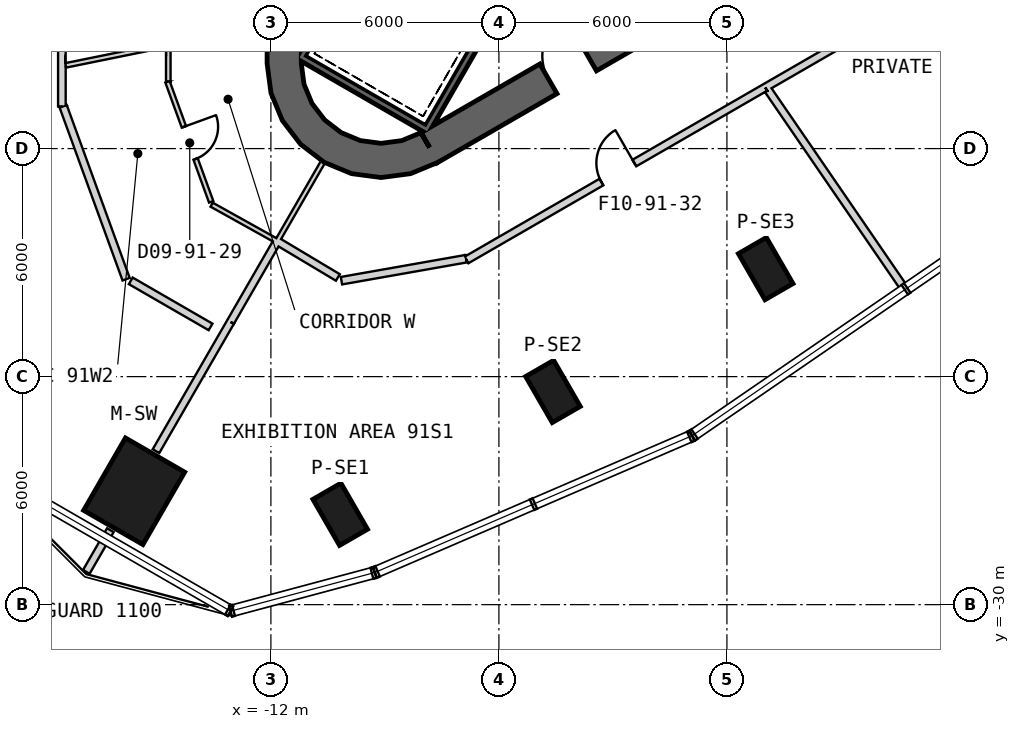
"""IFC4 building model, lengths in metres.
Left out: names, types, materials, properties, quantities, classifications, styles, units other than length and angle.
Written with IfcOpenShell. Run it as: python <this file> out.ifc"""

import sys

from ifc_helpers import new_model, si_unit, direction, frame, frame_2d, origin, origin_2d, place, context, subcontext, project, spatial, polyline, rectangle, outline, extrude, element, fill, save


model = new_model("IFC4")
c1 = context("Model", 3, precision=1e-05, world=origin(), true_north=direction((0.0, 1.0)))
c2 = subcontext(c1, "Body", "Model", "MODEL_VIEW")
j1 = project(units=[si_unit("LENGTHUNIT", "METRE"), si_unit("PLANEANGLEUNIT", "RADIAN")], contexts=[c1])
p1 = place(None, origin())
s1 = spatial("IfcSite", under=j1, at=p1, CompositionType="ELEMENT")
p2 = place(p1, origin())
s2 = spatial("IfcBuilding", under=s1, at=p2, CompositionType="ELEMENT")
p3 = place(p2, frame((0.0, 0.0, 398.3)))
s3 = spatial("IfcBuildingStorey", under=s2, at=p3, CompositionType="ELEMENT", Elevation=398.3)
p4 = place(p3, frame((-15.598, -27.016, 0.0), z_axis=(0.0, 0.0, 1.0), x_axis=(-0.5, -0.866025403784, 0.0)))
e1 = element("IfcColumn", 1, at=p4, inside=s3, PredefinedType="COLUMN", context=c2, shape_type="SweptSolid", body=[
    extrude(rectangle(XDim=2.2, YDim=1.8, at=origin_2d()), origin(), (0.0, 0.0, 1.0), 6.5),
])
for number, where, z_axis, x_axis in (
    (2, (-10.176, -27.623, 0.0), (0.0, 0.0, 1.0), (0.5, -0.866, 0.0)),
    (3, (-4.578, -24.391, 0.0), (0.0, 0.0, 1.0), (0.5, -0.866, 0.0)),
):
    element("IfcColumn", number, at=place(p3, frame(where, z_axis=z_axis, x_axis=x_axis)), inside=s3, PredefinedType="COLUMN", context=c2, shape_type="SweptSolid", body=[
        extrude(rectangle(XDim=1.4, YDim=0.85, at=origin_2d()), origin(), (0.0, 0.0, 1.0), 6.5),
    ])
p5 = place(p3, frame((1.02, -21.159, -0.3), z_axis=(0.0, 0.0, 1.0), x_axis=(0.5, -0.866025403784, 0.0)))
e4 = element("IfcColumn", 4, at=p5, inside=s3, PredefinedType="COLUMN", context=c2, shape_type="SweptSolid", body=[
    extrude(rectangle(XDim=1.4, YDim=0.85, at=origin_2d()), origin(), (0.0, 0.0, 1.0), 6.8),
])
p6 = place(p3, frame((-11.65, 15.762, 0.0), z_axis=(0.0, 0.0, 1.0), x_axis=(0.0, -1.0, 0.0)))
e5 = element("IfcWall", 5, at=p6, inside=s3, PredefinedType="SHEAR", context=c2, shape_type="SweptSolid", body=[
    extrude(rectangle(XDim=31.523, YDim=0.9, at=frame_2d((15.762, 0.0))), origin(), (0.0, 0.0, 1.0), 6.5),
])
p7 = place(p6, frame((3.612, 0.0, 0.0)))
e6 = element("IfcOpeningElement", 6, at=p7, cuts=e5, PredefinedType="OPENING", context=c2, shape_type="SweptSolid", body=[
    extrude(rectangle(XDim=1.2, YDim=2.4, at=frame_2d((0.6, 1.2))), frame((0.0, 0.46, 0.0), z_axis=(0.0, -1.0, 0.0), x_axis=(1.0, 0.0, 0.0)), (0.0, 0.0, 1.0), 0.92),
])
p8 = place(p6, frame((26.712, 0.0, 0.0)))
e7 = element("IfcOpeningElement", 7, at=p8, cuts=e5, PredefinedType="OPENING", context=c2, shape_type="SweptSolid", body=[
    extrude(rectangle(XDim=1.2, YDim=2.4, at=frame_2d((0.6, 1.2))), frame((0.0, 0.46, 0.0), z_axis=(0.0, -1.0, 0.0), x_axis=(1.0, 0.0, 0.0)), (0.0, 0.0, 1.0), 0.92),
])
p9 = place(p3, frame((-7.825, -17.97, 0.0), z_axis=(0.0, 0.0, 1.0), x_axis=(0.866028369851, 0.499994862586, 0.0)))
e8 = element("IfcWall", 8, at=p9, inside=s3, PredefinedType="SHEAR", context=c2, shape_type="SweptSolid", body=[
    extrude(rectangle(XDim=31.523, YDim=0.9, at=frame_2d((15.762, 0.0))), origin(), (0.0, 0.0, 1.0), 6.5),
])
p10 = place(p9, frame((7.062, 0.0, 0.0)))
e9 = element("IfcOpeningElement", 9, at=p10, cuts=e8, PredefinedType="OPENING", context=c2, shape_type="SweptSolid", body=[
    extrude(rectangle(XDim=1.2, YDim=2.4, at=frame_2d((0.6, 1.2))), frame((0.0, 0.46, 0.0), z_axis=(0.0, -1.0, 0.0), x_axis=(1.0, 0.0, 0.0)), (0.0, 0.0, 1.0), 0.92),
])
p11 = place(p9, frame((9.762, 0.0, 0.0)))
e10 = element("IfcOpeningElement", 10, at=p11, cuts=e8, PredefinedType="OPENING", context=c2, shape_type="SweptSolid", body=[
    extrude(rectangle(XDim=1.2, YDim=2.4, at=frame_2d((0.6, 1.2))), frame((0.0, 0.46, 0.0), z_axis=(0.0, -1.0, 0.0), x_axis=(1.0, 0.0, 0.0)), (0.0, 0.0, 1.0), 0.92),
])
p12 = place(p9, frame((17.862, 0.0, 0.0)))
e11 = element("IfcOpeningElement", 11, at=p12, cuts=e8, PredefinedType="OPENING", context=c2, shape_type="SweptSolid", body=[
    extrude(rectangle(XDim=1.2, YDim=2.4, at=frame_2d((0.6, 1.2))), frame((0.0, 0.46, 0.0), z_axis=(0.0, -1.0, 0.0), x_axis=(1.0, 0.0, 0.0)), (0.0, 0.0, 1.0), 0.92),
])
p13 = place(p9, frame((20.562, 0.0, 0.0)))
e12 = element("IfcOpeningElement", 12, at=p13, cuts=e8, PredefinedType="OPENING", context=c2, shape_type="SweptSolid", body=[
    extrude(rectangle(XDim=1.2, YDim=2.4, at=frame_2d((0.6, 1.2))), frame((0.0, 0.46, 0.0), z_axis=(0.0, -1.0, 0.0), x_axis=(1.0, 0.0, 0.0)), (0.0, 0.0, 1.0), 0.92),
])
p14 = place(p9, frame((26.712, 0.0, 0.0)))
e13 = element("IfcOpeningElement", 13, at=p14, cuts=e8, PredefinedType="OPENING", context=c2, shape_type="SweptSolid", body=[
    extrude(rectangle(XDim=1.2, YDim=2.4, at=frame_2d((0.6, 1.2))), frame((0.0, 0.46, 0.0), z_axis=(0.0, -1.0, 0.0), x_axis=(1.0, 0.0, 0.0)), (0.0, 0.0, 1.0), 0.92),
])
p15 = place(p9, frame((3.612, 0.0, 0.0)))
e14 = element("IfcOpeningElement", 14, at=p15, cuts=e8, PredefinedType="OPENING", context=c2, shape_type="SweptSolid", body=[
    extrude(rectangle(XDim=1.2, YDim=2.4, at=frame_2d((0.6, 1.2))), frame((0.0, 0.46, 0.0), z_axis=(0.0, -1.0, 0.0), x_axis=(1.0, 0.0, 0.0)), (0.0, 0.0, 1.0), 0.92),
])
p16 = place(p3, origin())
e15 = element("IfcWall", 15, at=p16, inside=s3, PredefinedType="SHEAR", context=c2, shape_type="SweptSolid", body=[
    extrude(outline(polyline([(-12.1, -15.762), (-11.998, -16.538), (-11.698, -17.262), (-11.221, -17.883), (-10.6, -18.36), (-9.876, -18.659), (-9.1, -18.762), (-8.323, -18.659), (-7.6, -18.36), (-8.05, -17.58), (-8.556, -17.79), (-9.1, -17.862), (-9.644, -17.79), (-10.15, -17.58), (-10.585, -17.247), (-10.919, -16.812), (-11.128, -16.305), (-11.2, -15.762), (-12.1, -15.762)])), origin(), (0.0, 0.0, 1.0), 6.5),
])
p17 = place(p3, frame((-3.905, -10.563, -0.3), z_axis=(0.0, 0.0, 1.0), x_axis=(-0.500012932018, -0.866017937352, 0.0)))
e16 = element("IfcWall", 16, at=p17, inside=s3, PredefinedType="SHEAR", context=c2, shape_type="SweptSolid", body=[
    extrude(rectangle(XDim=8.1, YDim=0.2, at=frame_2d((4.05, 0.0))), origin(), (0.0, 0.0, 1.0), 6.5),
])
p18 = place(p3, frame((-11.282, -15.541, -0.3), z_axis=(0.0, 0.0, 1.0), x_axis=(0.866000483506, -0.500043160704, 0.0)))
e17 = element("IfcWall", 17, at=p18, inside=s3, PredefinedType="SHEAR", context=c2, shape_type="SweptSolid", body=[
    extrude(rectangle(XDim=3.8, YDim=0.2, at=frame_2d((1.9, 0.0))), origin(), (0.0, 0.0, 1.0), 6.5),
])
p19 = place(p3, frame((-7.196, -8.663, -0.3), z_axis=(0.0, 0.0, 1.0), x_axis=(-0.499997992926, -0.866026562566, 0.0)))
e18 = element("IfcWall", 18, at=p19, inside=s3, PredefinedType="SHEAR", context=c2, shape_type="SweptSolid", body=[
    extrude(rectangle(XDim=7.9, YDim=0.2, at=frame_2d((3.95, 0.0))), origin(), (0.0, 0.0, 1.0), 6.5),
])
p20 = place(p3, frame((-14.7, -15.255, 0.0), z_axis=(0.0, 0.0, 1.0), x_axis=(0.0, -1.0, 0.0)))
e19 = element("IfcWall", 19, at=p20, inside=s3, PredefinedType="PARTITIONING", context=c2, shape_type="SweptSolid", body=[
    extrude(rectangle(XDim=0.985, YDim=0.12, at=frame_2d((0.492, 0.0))), origin(), (0.0, 0.0, 1.0), 6.2),
])
p21 = place(p3, frame((-13.559, -19.476, 0.0), z_axis=(0.0, 0.0, 1.0), x_axis=(0.873536168316, -0.486759245052, 0.0)))
e20 = element("IfcWall", 20, at=p21, inside=s3, PredefinedType="PARTITIONING", context=c2, shape_type="SweptSolid", body=[
    extrude(rectangle(XDim=2.005, YDim=0.12, at=frame_2d((1.002, 0.0))), origin(), (0.0, 0.0, 1.0), 5.57),
])
p22 = place(p3, frame((-14.72, -16.243, 0.0), z_axis=(0.0, 0.0, 1.0), x_axis=(0.342046381322, -0.939683070521, 0.0)))
e21 = element("IfcWall", 21, at=p22, inside=s3, PredefinedType="PARTITIONING", context=c2, shape_type="SweptSolid", body=[
    extrude(rectangle(XDim=3.36, YDim=0.12, at=frame_2d((1.68, 0.0))), origin(), (0.0, 0.0, 1.0), 5.57),
])
p23 = place(p22, frame((1.26, 0.0, 0.0)))
e22 = element("IfcOpeningElement", 22, at=p23, cuts=e21, PredefinedType="OPENING", context=c2, shape_type="SweptSolid", body=[
    extrude(rectangle(XDim=0.9, YDim=2.1, at=frame_2d((0.45, 1.05))), frame((0.0, 0.07, 0.0), z_axis=(0.0, -1.0, 0.0), x_axis=(1.0, 0.0, 0.0)), (0.0, 0.0, 1.0), 0.14),
])
p24 = place(p3, frame((-10.549, -18.212, 0.0), z_axis=(0.0, 0.0, 1.0), x_axis=(-0.500047596559, -0.865997922154, 0.0)))
e23 = element("IfcWall", 23, at=p24, inside=s3, PredefinedType="PARTITIONING", context=c2, shape_type="SweptSolid", body=[
    extrude(rectangle(XDim=2.6, YDim=0.12, at=frame_2d((1.3, 0.0))), origin(), (0.0, 0.0, 1.0), 5.57),
])
p25 = place(p3, frame((-17.5, -16.893, 0.0), z_axis=(0.0, 0.0, 1.0), x_axis=(0.0, 1.0, 0.0)))
e24 = element("IfcWall", 24, at=p25, inside=s3, PredefinedType="PARTITIONING", context=c2, shape_type="SweptSolid", body=[
    extrude(rectangle(XDim=1.052, YDim=0.2, at=frame_2d((0.526, 0.0))), origin(), (0.0, 0.0, 1.0), 6.2),
])
p26 = place(p3, frame((-17.5, -15.841, 0.0), z_axis=(0.0, 0.0, 1.0), x_axis=(0.0, 1.0, 0.0)))
e25 = element("IfcWall", 25, at=p26, inside=s3, PredefinedType="PARTITIONING", context=c2, shape_type="SweptSolid", body=[
    extrude(rectangle(XDim=9.173, YDim=0.2, at=frame_2d((4.586, 0.0))), origin(), (0.0, 0.0, 1.0), 5.57),
])
p27 = place(p3, frame((-17.466, -16.887, 0.0), z_axis=(0.0, 0.0, 1.0), x_axis=(0.342054816013, -0.939680000235, 0.0)))
e26 = element("IfcWall", 26, at=p27, inside=s3, PredefinedType="PARTITIONING", context=c2, shape_type="SweptSolid", body=[
    extrude(rectangle(XDim=4.841, YDim=0.2, at=frame_2d((2.421, 0.0))), origin(), (0.0, 0.0, 1.0), 5.57),
])
p28 = place(p3, frame((-15.688, -21.48, 0.0), z_axis=(0.0, 0.0, 1.0), x_axis=(0.866041403502, -0.499972286653, 0.0)))
e27 = element("IfcWall", 27, at=p28, inside=s3, PredefinedType="PARTITIONING", context=c2, shape_type="SweptSolid", body=[
    extrude(rectangle(XDim=2.425, YDim=0.2, at=frame_2d((1.212, 0.0))), origin(), (0.0, 0.0, 1.0), 6.2),
])
p29 = place(p3, frame((-16.858, -29.138, 0.0), z_axis=(0.0, 0.0, 1.0), x_axis=(0.499950289094, 0.866054102487, 0.0)))
e28 = element("IfcWall", 28, at=p29, inside=s3, PredefinedType="PARTITIONING", context=c2, shape_type="SweptSolid", body=[
    extrude(rectangle(XDim=1.268, YDim=0.2, at=frame_2d((0.634, 0.0))), origin(), (0.0, 0.0, 1.0), 6.2),
])
p30 = place(p3, frame((-15.024, -25.962, 0.0), z_axis=(0.0, 0.0, 1.0), x_axis=(0.500004108169, 0.866023031919, 0.0)))
e29 = element("IfcWall", 29, at=p30, inside=s3, PredefinedType="PARTITIONING", context=c2, shape_type="SweptSolid", body=[
    extrude(rectangle(XDim=3.927, YDim=0.2, at=frame_2d((1.963, 0.0))), origin(), (0.0, 0.0, 1.0), 5.57),
])
p31 = place(p3, frame((-17.4, -15.811, 0.0), z_axis=(0.0, 0.0, 1.0), x_axis=(0.979941162084, 0.199287026304, 0.0)))
e30 = element("IfcWall", 30, at=p31, inside=s3, PredefinedType="PARTITIONING", context=c2, shape_type="SweptSolid", body=[
    extrude(rectangle(XDim=2.694, YDim=0.12, at=frame_2d((1.347, 0.0))), origin(), (0.0, 0.0, 1.0), 6.2),
])
p32 = place(p3, frame((-11.849, -20.463, 0.0), z_axis=(0.0, 0.0, 1.0), x_axis=(-0.49997539674, -0.866039608017, 0.0)))
e31 = element("IfcWall", 31, at=p32, inside=s3, PredefinedType="PARTITIONING", context=c2, shape_type="SweptSolid", body=[
    extrude(rectangle(XDim=2.423, YDim=0.2, at=frame_2d((1.211, 0.0))), origin(), (0.0, 0.0, 1.0), 5.57),
])
p33 = place(p3, frame((-6.852, -20.93, 0.0), z_axis=(0.0, 0.0, 1.0), x_axis=(0.866016739626, 0.500015006463, 0.0)))
e32 = element("IfcWall", 32, at=p33, inside=s3, PredefinedType="PARTITIONING", context=c2, shape_type="SweptSolid", body=[
    extrude(rectangle(XDim=9.078, YDim=0.2, at=frame_2d((4.539, 0.0))), origin(), (0.0, 0.0, 1.0), 5.57),
])
p34 = place(p33, frame((4.1, 0.0, 0.0)))
e33 = element("IfcOpeningElement", 33, at=p34, cuts=e32, PredefinedType="OPENING", context=c2, shape_type="SweptSolid", body=[
    extrude(rectangle(XDim=1.0, YDim=2.1, at=frame_2d((0.5, 1.05))), frame((0.0, 0.11, 0.0), z_axis=(0.0, -1.0, 0.0), x_axis=(1.0, 0.0, 0.0)), (0.0, 0.0, 1.0), 0.22),
])
p35 = place(p3, frame((1.009, -16.391, 0.0), z_axis=(0.0, 0.0, 1.0), x_axis=(0.866026744585, 0.499997677658, 0.0)))
e34 = element("IfcWall", 34, at=p35, inside=s3, PredefinedType="PARTITIONING", context=c2, shape_type="SweptSolid", body=[
    extrude(rectangle(XDim=13.617, YDim=0.2, at=frame_2d((6.808, 0.0))), origin(), (0.0, 0.0, 1.0), 5.67),
])
p36 = place(p35, frame((6.456, 0.0, 0.0)))
e35 = element("IfcOpeningElement", 35, at=p36, cuts=e34, PredefinedType="OPENING", context=c2, shape_type="SweptSolid", body=[
    extrude(rectangle(XDim=1.0, YDim=2.1, at=frame_2d((0.5, 1.05))), frame((0.0, 0.11, 0.0), z_axis=(0.0, -1.0, 0.0), x_axis=(1.0, 0.0, 0.0)), (0.0, 0.0, 1.0), 0.22),
])
p37 = place(p3, frame((-10.143, -21.476, 0.0), z_axis=(0.0, 0.0, 1.0), x_axis=(0.98480864774, 0.173643103339, 0.0)))
e36 = element("IfcWall", 36, at=p37, inside=s3, PredefinedType="PARTITIONING", context=c2, shape_type="SweptSolid", body=[
    extrude(rectangle(XDim=3.329, YDim=0.2, at=frame_2d((1.665, 0.0))), origin(), (0.0, 0.0, 1.0), 5.57),
])
p38 = place(p3, frame((-11.808, -20.452, 0.0), z_axis=(0.0, 0.0, 1.0), x_axis=(0.858362923554, -0.51304297234, 0.0)))
e37 = element("IfcWall", 37, at=p38, inside=s3, PredefinedType="PARTITIONING", context=c2, shape_type="SweptSolid", body=[
    extrude(rectangle(XDim=1.83, YDim=0.2, at=frame_2d((0.915, 0.0))), origin(), (0.0, 0.0, 1.0), 5.57),
])
p39 = place(p3, frame((4.688, -21.709, 0.0), z_axis=(0.0, 0.0, 1.0), x_axis=(-0.565893636681, 0.824478254391, 0.0)))
e38 = element("IfcWall", 38, at=p39, inside=s3, PredefinedType="PARTITIONING", context=c2, shape_type="SweptSolid", body=[
    extrude(rectangle(XDim=6.364, YDim=0.2, at=frame_2d((3.182, 0.0))), origin(), (0.0, 0.0, 1.0), 6.2),
])
p40 = place(p23, origin())
e39 = element("IfcDoor", 39, at=p40, inside=s3, OperationType="SINGLE_SWING_LEFT", PredefinedType="NOTDEFINED", context=c2, shape_type="SweptSolid", body=[
    extrude(rectangle(XDim=0.9, YDim=2.1, at=frame_2d((0.45, 1.05))), frame((0.0, 0.025, 0.0), z_axis=(0.0, -1.0, 0.0), x_axis=(1.0, 0.0, 0.0)), (0.0, 0.0, 1.0), 0.05),
])
fill(e22, e39)
p41 = place(p34, origin())
e40 = element("IfcDoor", 40, at=p41, inside=s3, OperationType="SINGLE_SWING_RIGHT", PredefinedType="USERDEFINED", context=c2, shape_type="SweptSolid", body=[
    extrude(rectangle(XDim=1.0, YDim=2.1, at=frame_2d((0.5, 1.05))), frame((0.0, 0.025, 0.0), z_axis=(0.0, -1.0, 0.0), x_axis=(1.0, 0.0, 0.0)), (0.0, 0.0, 1.0), 0.05),
])
fill(e33, e40)
p42 = place(p15, origin())
e41 = element("IfcDoor", 41, at=p42, inside=s3, OperationType="SINGLE_SWING_RIGHT", PredefinedType="USERDEFINED", context=c2, shape_type="SweptSolid", body=[
    extrude(rectangle(XDim=1.2, YDim=2.4, at=frame_2d((0.6, 1.2))), frame((0.0, 0.025, 0.0), z_axis=(0.0, -1.0, 0.0), x_axis=(1.0, 0.0, 0.0)), (0.0, 0.0, 1.0), 0.05),
])
fill(e14, e41)
save(model, sys.argv[1])
